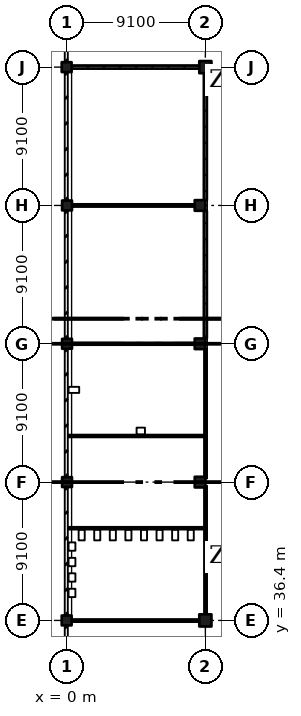
"""IFC4 building model, lengths in metres.
Left out: names, types, materials, properties, quantities, classifications, styles, units other than length and angle.
Written with IfcOpenShell. Run it as: python <this file> out.ifc"""

import sys

from ifc_helpers import new_model, si_unit, direction, frame, frame_2d, origin, origin_2d, place, context, subcontext, project, spatial, rectangle, extrude, element, fill, save


model = new_model("IFC4")
c1 = context("Model", 3, precision=1e-05, world=origin(), true_north=direction((0.0, 1.0)))
c2 = subcontext(c1, "Body", "Model", "MODEL_VIEW")
j1 = project(units=[si_unit("LENGTHUNIT", "METRE"), si_unit("PLANEANGLEUNIT", "RADIAN")], contexts=[c1])
p1 = place(None, origin())
s1 = spatial("IfcSite", under=j1, at=p1, CompositionType="ELEMENT")
p2 = place(p1, origin())
s2 = spatial("IfcBuilding", under=s1, at=p2, CompositionType="ELEMENT")
p3 = place(p2, frame((0.0, 0.0, 6.37)))
s3 = spatial("IfcBuildingStorey", under=s2, at=p3, CompositionType="ELEMENT", Elevation=6.37)
for number, where, z_axis, x_axis in (
    (1, (-0.025, 36.4, 0.0), (0.0, 0.0, 1.0), (1.0, 0.0, 0.0)),
    (2, (0.0, 45.5, 0.0), (0.0, 0.0, 1.0), (1.0, 0.0, 0.0)),
    (3, (0.0, 54.6, 0.0), (0.0, 0.0, 1.0), (1.0, 0.0, 0.0)),
    (4, (0.0, 63.7, 0.0), (0.0, 0.0, 1.0), (1.0, 0.0, 0.0)),
    (5, (-0.025, 72.8, 0.0), (0.0, 0.0, 1.0), (1.0, 0.0, 0.0)),
):
    element("IfcColumn", number, at=place(p3, frame(where, z_axis=z_axis, x_axis=x_axis)), inside=s3, PredefinedType="COLUMN", context=c2, shape_type="SweptSolid", body=[
        extrude(rectangle(XDim=0.65, YDim=0.65, at=origin_2d()), origin(), (0.0, 0.0, 1.0), 4.55),
    ])
p4 = place(p3, frame((9.1, 36.4, 0.0), z_axis=(0.0, 0.0, 1.0), x_axis=(1.0, 0.0, 0.0)))
e6 = element("IfcColumn", 6, at=p4, inside=s3, PredefinedType="COLUMN", context=c2, shape_type="SweptSolid", body=[
    extrude(rectangle(XDim=0.8, YDim=0.8, at=origin_2d()), origin(), (0.0, 0.0, 1.0), 4.55),
])
for number, where, z_axis, x_axis in (
    (7, (8.75, 45.5, 0.0), (0.0, 0.0, 1.0), (1.0, 0.0, 0.0)),
    (8, (8.75, 54.6, 0.0), (0.0, 0.0, 1.0), (1.0, 0.0, 0.0)),
    (9, (8.75, 63.7, 0.0), (0.0, 0.0, 1.0), (1.0, 0.0, 0.0)),
):
    element("IfcColumn", number, at=place(p3, frame(where, z_axis=z_axis, x_axis=x_axis)), inside=s3, PredefinedType="COLUMN", context=c2, shape_type="SweptSolid", body=[
        extrude(rectangle(XDim=0.7, YDim=0.7, at=origin_2d()), origin(), (0.0, 0.0, 1.0), 4.55),
    ])
p5 = place(p3, frame((9.1, 72.8, 0.0), z_axis=(0.0, 0.0, 1.0), x_axis=(1.0, 0.0, 0.0)))
e10 = element("IfcColumn", 10, at=p5, inside=s3, PredefinedType="COLUMN", context=c2, shape_type="SweptSolid", body=[
    extrude(rectangle(XDim=0.8, YDim=0.8, at=origin_2d()), origin(), (0.0, 0.0, 1.0), 4.55),
])
for number, where, z_axis, x_axis in (
    (11, (0.03, 42.467, 0.0), (0.0, 0.0, 1.0), (1.0, 0.0, 0.0)),
    (12, (0.03, 48.533, 0.0), (0.0, 0.0, 1.0), (1.0, 0.0, 0.0)),
):
    element("IfcWall", number, at=place(p3, frame(where, z_axis=z_axis, x_axis=x_axis)), inside=s3, PredefinedType="PARTITIONING", context=c2, shape_type="SweptSolid", body=[
        extrude(rectangle(XDim=9.008, YDim=0.125, at=frame_2d((4.504, 0.0))), origin(), (0.0, 0.0, 1.0), 3.9),
    ])
p6 = place(p3, frame((0.3, 36.4, 0.0), z_axis=(0.0, 0.0, 1.0), x_axis=(1.0, 0.0, 0.0)))
e13 = element("IfcWall", 13, at=p6, inside=s3, PredefinedType="PARTITIONING", context=c2, shape_type="SweptSolid", body=[
    extrude(rectangle(XDim=8.4, YDim=0.125, at=frame_2d((4.2, 0.0))), origin(), (0.0, 0.0, 1.0), 3.9),
])
p7 = place(p6, frame((3.75, 0.0, 0.0)))
e14 = element("IfcOpeningElement", 14, at=p7, cuts=e13, PredefinedType="OPENING", context=c2, shape_type="SweptSolid", body=[
    extrude(rectangle(XDim=0.9, YDim=2.1, at=frame_2d((0.45, 1.05))), frame((0.0, 0.073, 0.0), z_axis=(0.0, -1.0, 0.0), x_axis=(1.0, 0.0, 0.0)), (0.0, 0.0, 1.0), 0.145),
])
p8 = place(p3, frame((0.325, 54.6, 0.0), z_axis=(0.0, 0.0, 1.0), x_axis=(1.0, 0.0, 0.0)))
e15 = element("IfcWall", 15, at=p8, inside=s3, PredefinedType="PARTITIONING", context=c2, shape_type="SweptSolid", body=[
    extrude(rectangle(XDim=8.075, YDim=0.125, at=frame_2d((4.038, 0.0))), origin(), (0.0, 0.0, 1.0), 3.9),
])
p9 = place(p3, frame((0.325, 63.7, 0.0), z_axis=(0.0, 0.0, 1.0), x_axis=(1.0, 0.0, 0.0)))
e16 = element("IfcWall", 16, at=p9, inside=s3, PredefinedType="PARTITIONING", context=c2, shape_type="SweptSolid", body=[
    extrude(rectangle(XDim=8.075, YDim=0.15, at=frame_2d((4.038, 0.0))), origin(), (0.0, 0.0, 1.0), 3.9),
])
p10 = place(p3, frame((8.7, 72.8, 0.0), z_axis=(0.0, 0.0, 1.0), x_axis=(-1.0, 0.0, 0.0)))
e17 = element("IfcWall", 17, at=p10, inside=s3, PredefinedType="PARTITIONING", context=c2, shape_type="SweptSolid", body=[
    extrude(rectangle(XDim=8.4, YDim=0.2, at=frame_2d((4.2, 0.0))), origin(), (0.0, 0.0, 1.0), 3.9),
])
p11 = place(p10, frame((3.25, 0.0, 0.0)))
e18 = element("IfcOpeningElement", 18, at=p11, cuts=e17, PredefinedType="OPENING", context=c2, shape_type="SweptSolid", body=[
    extrude(rectangle(XDim=1.8, YDim=2.1, at=frame_2d((0.9, 1.05))), frame((0.0, 0.11, 0.0), z_axis=(0.0, -1.0, 0.0), x_axis=(1.0, 0.0, 0.0)), (0.0, 0.0, 1.0), 0.22),
])
p12 = place(p3, frame((9.1, 36.8, 0.0), z_axis=(0.0, 0.0, 1.0), x_axis=(0.0, 1.0, 0.0)))
e19 = element("IfcWall", 19, at=p12, inside=s3, PredefinedType="PARTITIONING", context=c2, shape_type="SweptSolid", body=[
    extrude(rectangle(XDim=8.35, YDim=0.125, at=frame_2d((4.175, 0.0))), origin(), (0.0, 0.0, 1.0), 3.9),
])
p13 = place(p12, frame((6.517, 0.0, 0.0)))
e20 = element("IfcOpeningElement", 20, at=p13, cuts=e19, PredefinedType="OPENING", context=c2, shape_type="SweptSolid", body=[
    extrude(rectangle(XDim=0.9, YDim=2.1, at=frame_2d((0.45, 1.05))), frame((0.0, 0.073, 0.0), z_axis=(0.0, -1.0, 0.0), x_axis=(1.0, 0.0, 0.0)), (0.0, 0.0, 1.0), 0.145),
])
p14 = place(p3, frame((9.1, 45.85, 0.0), z_axis=(0.0, 0.0, 1.0), x_axis=(0.0, 1.0, 0.0)))
e21 = element("IfcWall", 21, at=p14, inside=s3, PredefinedType="PARTITIONING", context=c2, shape_type="SweptSolid", body=[
    extrude(rectangle(XDim=8.4, YDim=0.125, at=frame_2d((4.2, 0.0))), origin(), (0.0, 0.0, 1.0), 3.9),
])
p15 = place(p14, frame((5.033, 0.0, 0.0)))
e22 = element("IfcOpeningElement", 22, at=p15, cuts=e21, PredefinedType="OPENING", context=c2, shape_type="SweptSolid", body=[
    extrude(rectangle(XDim=1.0, YDim=2.1, at=frame_2d((0.5, 1.05))), frame((0.0, 0.073, 0.0), z_axis=(0.0, -1.0, 0.0), x_axis=(1.0, 0.0, 0.0)), (0.0, 0.0, 1.0), 0.145),
])
p16 = place(p3, frame((9.1, 54.95, 0.0), z_axis=(0.0, 0.0, 1.0), x_axis=(0.0, 1.0, 0.0)))
e23 = element("IfcWall", 23, at=p16, inside=s3, PredefinedType="PARTITIONING", context=c2, shape_type="SweptSolid", body=[
    extrude(rectangle(XDim=8.4, YDim=0.2, at=frame_2d((4.2, 0.0))), origin(), (0.0, 0.0, 1.0), 3.9),
])
p17 = place(p16, frame((3.55, 0.0, 0.0)))
e24 = element("IfcOpeningElement", 24, at=p17, cuts=e23, PredefinedType="OPENING", context=c2, shape_type="SweptSolid", body=[
    extrude(rectangle(XDim=1.2, YDim=2.1, at=frame_2d((0.6, 1.05))), frame((0.0, 0.11, 0.0), z_axis=(0.0, -1.0, 0.0), x_axis=(1.0, 0.0, 0.0)), (0.0, 0.0, 1.0), 0.22),
])
p18 = place(p3, frame((9.1, 64.05, 0.0), z_axis=(0.0, 0.0, 1.0), x_axis=(0.0, 1.0, 0.0)))
e25 = element("IfcWall", 25, at=p18, inside=s3, PredefinedType="PARTITIONING", context=c2, shape_type="SweptSolid", body=[
    extrude(rectangle(XDim=8.35, YDim=0.2, at=frame_2d((4.175, 0.0))), origin(), (0.0, 0.0, 1.0), 3.9),
])
p19 = place(p7, origin())
e26 = element("IfcDoor", 26, at=p19, inside=s3, OperationType="SINGLE_SWING_LEFT", PredefinedType="DOOR", context=c2, shape_type="SweptSolid", body=[
    extrude(rectangle(XDim=0.9, YDim=2.1, at=frame_2d((0.45, 1.05))), frame((0.0, 0.025, 0.0), z_axis=(0.0, -1.0, 0.0), x_axis=(1.0, 0.0, 0.0)), (0.0, 0.0, 1.0), 0.05),
])
fill(e14, e26)
p20 = place(p13, origin())
e27 = element("IfcDoor", 27, at=p20, inside=s3, OperationType="SINGLE_SWING_RIGHT", PredefinedType="DOOR", context=c2, shape_type="SweptSolid", body=[
    extrude(rectangle(XDim=0.9, YDim=2.1, at=frame_2d((0.45, 1.05))), frame((0.0, 0.025, 0.0), z_axis=(0.0, -1.0, 0.0), x_axis=(1.0, 0.0, 0.0)), (0.0, 0.0, 1.0), 0.05),
])
fill(e20, e27)
p21 = place(p15, origin())
e28 = element("IfcDoor", 28, at=p21, inside=s3, OperationType="SINGLE_SWING_RIGHT", PredefinedType="DOOR", context=c2, shape_type="SweptSolid", body=[
    extrude(rectangle(XDim=1.0, YDim=2.1, at=frame_2d((0.5, 1.05))), frame((0.0, 0.025, 0.0), z_axis=(0.0, -1.0, 0.0), x_axis=(1.0, 0.0, 0.0)), (0.0, 0.0, 1.0), 0.05),
])
fill(e22, e28)
p22 = place(p17, origin())
e29 = element("IfcDoor", 29, at=p22, inside=s3, OperationType="SINGLE_SWING_RIGHT", PredefinedType="DOOR", context=c2, shape_type="SweptSolid", body=[
    extrude(rectangle(XDim=1.2, YDim=2.1, at=frame_2d((0.6, 1.05))), frame((0.0, 0.025, 0.0), z_axis=(0.0, -1.0, 0.0), x_axis=(1.0, 0.0, 0.0)), (0.0, 0.0, 1.0), 0.05),
])
fill(e24, e29)
p23 = place(p11, origin())
e30 = element("IfcDoor", 30, at=p23, inside=s3, OperationType="DOUBLE_DOOR_SINGLE_SWING", PredefinedType="DOOR", context=c2, shape_type="SweptSolid", body=[
    extrude(rectangle(XDim=1.8, YDim=2.1, at=frame_2d((0.9, 1.05))), frame((0.0, 0.025, 0.0), z_axis=(0.0, -1.0, 0.0), x_axis=(1.0, 0.0, 0.0)), (0.0, 0.0, 1.0), 0.05),
])
fill(e18, e30)
save(model, sys.argv[1])
